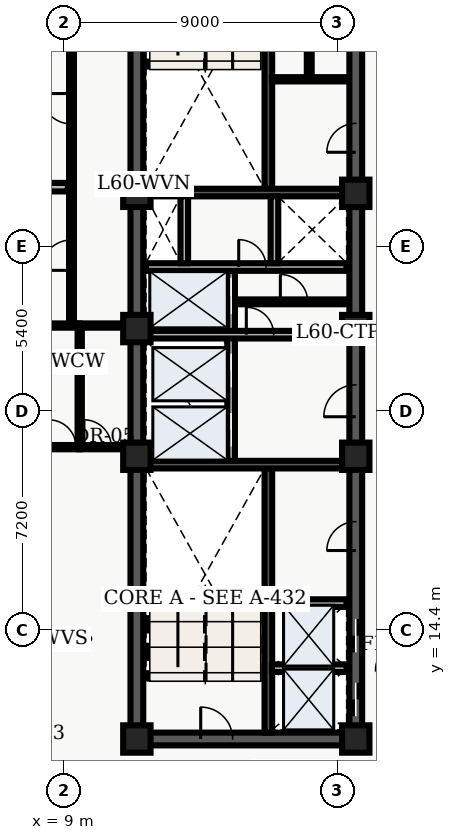
"""IFC4 building model, lengths in metres.
Left out: names, types, materials, properties, quantities, classifications, styles, units other than length and angle.
Written with IfcOpenShell. Run it as: python <this file> out.ifc"""

import sys

from ifc_helpers import new_model, entity, si_unit, converted_unit, direction, frame, origin_with_axes, origin_2d_with_axis, place, context, subcontext, project, spatial, polyline, rectangle, outline, extrude, element, fill, save


model = new_model("IFC4")
c1 = context("Model", 3, precision=1e-05, world=origin_with_axes(), true_north=direction((0.0, 1.0)))
c2 = subcontext(c1, "Body", "Model", "MODEL_VIEW")
j1 = project(units=[si_unit("LENGTHUNIT", "METRE"), converted_unit("PLANEANGLEUNIT", "DEGREE", entity("IfcPlaneAngleMeasure", 0.017), si_unit("PLANEANGLEUNIT", "RADIAN"), dimensions=[0, 0, 0, 0, 0, 0, 0])], contexts=[c1])
p1 = place(None, origin_with_axes())
s1 = spatial("IfcSite", under=j1, at=p1, CompositionType="ELEMENT")
p2 = place(p1, origin_with_axes())
s2 = spatial("IfcBuilding", under=s1, at=p2, CompositionType="ELEMENT")
p3 = place(p2, frame((0.0, 0.0, 244.2), z_axis=(0.0, 0.0, 1.0), x_axis=(1.0, 0.0, 0.0)))
s3 = spatial("IfcBuildingStorey", under=s2, at=p3, CompositionType="ELEMENT", Elevation=244.2)
p4 = place(p3, frame((11.4, 10.8, 0.0), z_axis=(0.0, 0.0, 1.0), x_axis=(0.0, 1.0, 0.0)))
e1 = element("IfcWall", 1, at=p4, inside=s3, PredefinedType="SHEAR", context=c2, shape_type="SweptSolid", body=[
    extrude(outline(polyline([(0.0, -0.21), (27.0, -0.21), (27.0, 0.21), (0.0, 0.21), (0.0, -0.21)])), origin_with_axes(), (0.0, 0.0, 1.0), 3.6),
])
p5 = place(p3, frame((11.4, 10.8, 0.0), z_axis=(0.0, 0.0, 1.0), x_axis=(1.0, 0.0, 0.0)))
e2 = element("IfcWall", 2, at=p5, inside=s3, PredefinedType="SHEAR", context=c2, shape_type="SweptSolid", body=[
    extrude(outline(polyline([(0.0, -0.21), (7.2, -0.21), (7.2, 0.21), (0.0, 0.21), (0.0, -0.21)])), origin_with_axes(), (0.0, 0.0, 1.0), 3.6),
])
p6 = place(p5, frame((2.625, 0.0, 0.0), z_axis=(0.0, 0.0, 1.0), x_axis=(1.0, 0.0, 0.0)))
e3 = element("IfcOpeningElement", 3, at=p6, cuts=e2, PredefinedType="OPENING", context=c2, shape_type="SweptSolid", body=[
    extrude(rectangle(XDim=1.05, YDim=0.44, at=origin_2d_with_axis()), origin_with_axes(), (0.0, 0.0, 1.0), 2.15),
])
p7 = place(p3, frame((18.6, 10.8, 0.0), z_axis=(0.0, 0.0, 1.0), x_axis=(0.0, 1.0, 0.0)))
e4 = element("IfcWall", 4, at=p7, inside=s3, PredefinedType="SHEAR", context=c2, shape_type="SweptSolid", body=[
    extrude(outline(polyline([(0.0, -0.21), (13.5, -0.21), (13.5, 0.21), (0.0, 0.21), (0.0, -0.21)])), origin_with_axes(), (0.0, 0.0, 1.0), 3.6),
])
p8 = place(p7, frame((1.3, 0.0, 0.0), z_axis=(0.0, 0.0, 1.0), x_axis=(1.0, 0.0, 0.0)))
e5 = element("IfcOpeningElement", 5, at=p8, cuts=e4, PredefinedType="OPENING", context=c2, shape_type="SweptSolid", body=[
    extrude(rectangle(XDim=1.1, YDim=0.44, at=origin_2d_with_axis()), origin_with_axes(), (0.0, 0.0, 1.0), 2.15),
])
p9 = place(p7, frame((3.4, 0.0, 0.0), z_axis=(0.0, 0.0, 1.0), x_axis=(1.0, 0.0, 0.0)))
e6 = element("IfcOpeningElement", 6, at=p9, cuts=e4, PredefinedType="OPENING", context=c2, shape_type="SweptSolid", body=[
    extrude(rectangle(XDim=1.1, YDim=0.44, at=origin_2d_with_axis()), origin_with_axes(), (0.0, 0.0, 1.0), 2.15),
])
p10 = place(p7, frame((11.125, 0.0, 0.0), z_axis=(0.0, 0.0, 1.0), x_axis=(1.0, 0.0, 0.0)))
e7 = element("IfcOpeningElement", 7, at=p10, cuts=e4, PredefinedType="OPENING", context=c2, shape_type="SweptSolid", body=[
    extrude(rectangle(XDim=1.05, YDim=0.44, at=origin_2d_with_axis()), origin_with_axes(), (0.0, 0.0, 1.0), 2.15),
])
p11 = place(p7, frame((6.675, 0.0, 0.0), z_axis=(0.0, 0.0, 1.0), x_axis=(1.0, 0.0, 0.0)))
e8 = element("IfcOpeningElement", 8, at=p11, cuts=e4, PredefinedType="OPENING", context=c2, shape_type="SweptSolid", body=[
    extrude(rectangle(XDim=0.95, YDim=0.44, at=origin_2d_with_axis()), origin_with_axes(), (0.0, 0.0, 1.0), 2.15),
])
p12 = place(p3, frame((18.6, 24.3, 0.0), z_axis=(0.0, 0.0, 1.0), x_axis=(0.0, 1.0, 0.0)))
e9 = element("IfcWall", 9, at=p12, inside=s3, PredefinedType="SHEAR", context=c2, shape_type="SweptSolid", body=[
    extrude(outline(polyline([(0.0, -0.21), (13.5, -0.21), (13.5, 0.21), (0.0, 0.21), (0.0, -0.21)])), origin_with_axes(), (0.0, 0.0, 1.0), 3.6),
])
p13 = place(p12, frame((6.275, 0.0, 0.0), z_axis=(0.0, 0.0, 1.0), x_axis=(1.0, 0.0, 0.0)))
e10 = element("IfcOpeningElement", 10, at=p13, cuts=e9, PredefinedType="OPENING", context=c2, shape_type="SweptSolid", body=[
    extrude(rectangle(XDim=0.95, YDim=0.44, at=origin_2d_with_axis()), origin_with_axes(), (0.0, 0.0, 1.0), 2.15),
])
p14 = place(p12, frame((10.875, 0.0, 0.0), z_axis=(0.0, 0.0, 1.0), x_axis=(1.0, 0.0, 0.0)))
e11 = element("IfcOpeningElement", 11, at=p14, cuts=e9, PredefinedType="OPENING", context=c2, shape_type="SweptSolid", body=[
    extrude(rectangle(XDim=0.95, YDim=0.44, at=origin_2d_with_axis()), origin_with_axes(), (0.0, 0.0, 1.0), 2.15),
])
p15 = place(p3, frame((15.725, 11.01, 0.0), z_axis=(0.0, 0.0, 1.0), x_axis=(0.0, 1.0, 0.0)))
e12 = element("IfcWall", 12, at=p15, inside=s3, PredefinedType="SHEAR", context=c2, shape_type="SweptSolid", body=[
    extrude(outline(polyline([(0.0, -0.125), (8.69, -0.125), (8.69, 0.125), (0.0, 0.125), (0.0, -0.125)])), origin_with_axes(), (0.0, 0.0, 1.0), 3.6),
])
p16 = place(p3, frame((11.61, 19.825, 0.0), z_axis=(0.0, 0.0, 1.0), x_axis=(1.0, 0.0, 0.0)))
e13 = element("IfcWall", 13, at=p16, inside=s3, PredefinedType="SHEAR", context=c2, shape_type="SweptSolid", body=[
    extrude(outline(polyline([(0.0, -0.125), (6.78, -0.125), (6.78, 0.125), (0.0, 0.125), (0.0, -0.125)])), origin_with_axes(), (0.0, 0.0, 1.0), 3.6),
])
p17 = place(p3, frame((15.725, 28.9, 0.0), z_axis=(0.0, 0.0, 1.0), x_axis=(0.0, 1.0, 0.0)))
e14 = element("IfcWall", 14, at=p17, inside=s3, PredefinedType="SHEAR", context=c2, shape_type="SweptSolid", body=[
    extrude(outline(polyline([(0.0, -0.125), (8.69, -0.125), (8.69, 0.125), (0.0, 0.125), (0.0, -0.125)])), origin_with_axes(), (0.0, 0.0, 1.0), 3.6),
])
p18 = place(p3, frame((11.61, 28.775, 0.0), z_axis=(0.0, 0.0, 1.0), x_axis=(1.0, 0.0, 0.0)))
e15 = element("IfcWall", 15, at=p18, inside=s3, PredefinedType="SHEAR", context=c2, shape_type="SweptSolid", body=[
    extrude(outline(polyline([(0.0, -0.125), (6.78, -0.125), (6.78, 0.125), (0.0, 0.125), (0.0, -0.125)])), origin_with_axes(), (0.0, 0.0, 1.0), 3.6),
])
p19 = place(p3, frame((14.5, 19.95, 0.0), z_axis=(0.0, 0.0, 1.0), x_axis=(0.0, 1.0, 0.0)))
e16 = element("IfcWall", 16, at=p19, inside=s3, PredefinedType="SOLIDWALL", context=c2, shape_type="SweptSolid", body=[
    extrude(outline(polyline([(0.0, -0.125), (6.25, -0.125), (6.25, 0.125), (0.0, 0.125), (0.0, -0.125)])), origin_with_axes(), (0.0, 0.0, 1.0), 2.64),
])
p20 = place(p19, frame((1.025, 0.0, 0.0), z_axis=(0.0, 0.0, 1.0), x_axis=(1.0, 0.0, 0.0)))
e17 = element("IfcOpeningElement", 17, at=p20, cuts=e16, PredefinedType="OPENING", context=c2, shape_type="SweptSolid", body=[
    extrude(rectangle(XDim=1.1, YDim=0.27, at=origin_2d_with_axis()), origin_with_axes(), (0.0, 0.0, 1.0), 2.15),
])
p21 = place(p19, frame((2.975, 0.0, 0.0), z_axis=(0.0, 0.0, 1.0), x_axis=(1.0, 0.0, 0.0)))
e18 = element("IfcOpeningElement", 18, at=p21, cuts=e16, PredefinedType="OPENING", context=c2, shape_type="SweptSolid", body=[
    extrude(rectangle(XDim=1.1, YDim=0.27, at=origin_2d_with_axis()), origin_with_axes(), (0.0, 0.0, 1.0), 2.15),
])
p22 = place(p19, frame((5.425, 0.0, 0.0), z_axis=(0.0, 0.0, 1.0), x_axis=(1.0, 0.0, 0.0)))
e19 = element("IfcOpeningElement", 19, at=p22, cuts=e16, PredefinedType="OPENING", context=c2, shape_type="SweptSolid", body=[
    extrude(rectangle(XDim=1.2, YDim=0.27, at=origin_2d_with_axis()), origin_with_axes(), (0.0, 0.0, 1.0), 2.15),
])
p23 = place(p3, frame((11.7, 24.1, 0.0), z_axis=(0.0, 0.0, 1.0), x_axis=(1.0, 0.0, 0.0)))
e20 = element("IfcWall", 20, at=p23, inside=s3, PredefinedType="SOLIDWALL", context=c2, shape_type="SweptSolid", body=[
    extrude(outline(polyline([(0.0, -0.125), (6.6, -0.125), (6.6, 0.125), (0.0, 0.125), (0.0, -0.125)])), origin_with_axes(), (0.0, 0.0, 1.0), 2.64),
])
p24 = place(p23, frame((3.75, 0.0, 0.0), z_axis=(0.0, 0.0, 1.0), x_axis=(1.0, 0.0, 0.0)))
e21 = element("IfcOpeningElement", 21, at=p24, cuts=e20, PredefinedType="OPENING", context=c2, shape_type="SweptSolid", body=[
    extrude(rectangle(XDim=0.9, YDim=0.27, at=origin_2d_with_axis()), origin_with_axes(), (0.0, 0.0, 1.0), 2.15),
])
p25 = place(p3, frame((11.7, 26.325, 0.0), z_axis=(0.0, 0.0, 1.0), x_axis=(1.0, 0.0, 0.0)))
e22 = element("IfcWall", 22, at=p25, inside=s3, PredefinedType="SOLIDWALL", context=c2, shape_type="SweptSolid", body=[
    extrude(outline(polyline([(0.0, -0.125), (6.6, -0.125), (6.6, 0.125), (0.0, 0.125), (0.0, -0.125)])), origin_with_axes(), (0.0, 0.0, 1.0), 2.64),
])
p26 = place(p25, frame((3.5, 0.0, 0.0), z_axis=(0.0, 0.0, 1.0), x_axis=(1.0, 0.0, 0.0)))
e23 = element("IfcOpeningElement", 23, at=p26, cuts=e22, PredefinedType="OPENING", context=c2, shape_type="SweptSolid", body=[
    extrude(rectangle(XDim=0.9, YDim=0.27, at=origin_2d_with_axis()), origin_with_axes(), (0.0, 0.0, 1.0), 2.15),
])
for number, where, z_axis, x_axis in (
    (24, (12.96, 26.45, 0.0), (0.0, 0.0, 1.0), (0.0, 1.0, 0.0)),
    (25, (15.925, 26.45, 0.0), (0.0, 0.0, 1.0), (0.0, 1.0, 0.0)),
):
    element("IfcWall", number, at=place(p3, frame(where, z_axis=z_axis, x_axis=x_axis)), inside=s3, PredefinedType="SOLIDWALL", context=c2, shape_type="SweptSolid", body=[
        extrude(outline(polyline([(0.0, -0.125), (2.2, -0.125), (2.2, 0.125), (0.0, 0.125), (0.0, -0.125)])), origin_with_axes(), (0.0, 0.0, 1.0), 2.64),
    ])
for number, where, z_axis, x_axis in (
    (26, (11.4, 10.8, 0.0), (0.0, 0.0, 1.0), (1.0, 0.0, 0.0)),
    (27, (11.4, 20.1, 0.0), (0.0, 0.0, 1.0), (1.0, 0.0, 0.0)),
    (28, (11.4, 24.3, 0.0), (0.0, 0.0, 1.0), (1.0, 0.0, 0.0)),
    (29, (11.4, 28.75, 0.0), (0.0, 0.0, 1.0), (1.0, 0.0, 0.0)),
    (30, (18.6, 10.8, 0.0), (0.0, 0.0, 1.0), (1.0, 0.0, 0.0)),
    (31, (18.6, 20.1, 0.0), (0.0, 0.0, 1.0), (1.0, 0.0, 0.0)),
    (32, (18.6, 24.3, 0.0), (0.0, 0.0, 1.0), (1.0, 0.0, 0.0)),
    (33, (18.6, 28.75, 0.0), (0.0, 0.0, 1.0), (1.0, 0.0, 0.0)),
):
    element("IfcColumn", number, at=place(p3, frame(where, z_axis=z_axis, x_axis=x_axis)), inside=s3, PredefinedType="COLUMN", context=c2, shape_type="SweptSolid", body=[
        extrude(rectangle(XDim=0.9, YDim=0.9, at=origin_2d_with_axis()), origin_with_axes(), (0.0, 0.0, 1.0), 3.9),
    ])
p27 = place(p3, frame((14.62, 25.18, 0.0), z_axis=(0.0, 0.0, 1.0), x_axis=(1.0, 0.0, 0.0)))
e34 = element("IfcWall", 34, at=p27, inside=s3, PredefinedType="PARTITIONING", context=c2, shape_type="SweptSolid", body=[
    extrude(outline(polyline([(0.0, -0.08), (3.68, -0.08), (3.68, 0.08), (0.0, 0.08), (0.0, -0.08)])), origin_with_axes(), (0.0, 0.0, 1.0), 2.64),
])
p28 = place(p27, frame((1.95, 0.0, 0.0), z_axis=(0.0, 0.0, 1.0), x_axis=(1.0, 0.0, 0.0)))
e35 = element("IfcOpeningElement", 35, at=p28, cuts=e34, PredefinedType="OPENING", context=c2, shape_type="SweptSolid", body=[
    extrude(rectangle(XDim=0.9, YDim=0.18, at=origin_2d_with_axis()), origin_with_axes(), (0.0, 0.0, 1.0), 2.15),
])
for number, where, z_axis, x_axis in (
    (36, (15.84, 13.13, 0.0), (0.0, 0.0, 1.0), (1.0, 0.0, 0.0)),
    (37, (15.84, 15.27, 0.0), (0.0, 0.0, 1.0), (1.0, 0.0, 0.0)),
):
    element("IfcWall", number, at=place(p3, frame(where, z_axis=z_axis, x_axis=x_axis)), inside=s3, PredefinedType="SOLIDWALL", context=c2, shape_type="SweptSolid", body=[
        extrude(outline(polyline([(0.0, -0.125), (2.46, -0.125), (2.46, 0.125), (0.0, 0.125), (0.0, -0.125)])), origin_with_axes(), (0.0, 0.0, 1.0), 2.64),
    ])
p29 = place(p3, frame((15.84, 32.5, 0.0), z_axis=(0.0, 0.0, 1.0), x_axis=(1.0, 0.0, 0.0)))
e38 = element("IfcWall", 38, at=p29, inside=s3, PredefinedType="PARTITIONING", context=c2, shape_type="SweptSolid", body=[
    extrude(outline(polyline([(0.0, -0.07), (2.46, -0.07), (2.46, 0.07), (0.0, 0.07), (0.0, -0.07)])), origin_with_axes(), (0.0, 0.0, 1.0), 2.64),
])
p30 = place(p3, frame((17.07, 32.58, 0.0), z_axis=(0.0, 0.0, 1.0), x_axis=(0.0, 1.0, 0.0)))
e39 = element("IfcWall", 39, at=p30, inside=s3, PredefinedType="PARTITIONING", context=c2, shape_type="SweptSolid", body=[
    extrude(outline(polyline([(0.0, -0.08), (4.92, -0.08), (4.92, 0.08), (0.0, 0.08), (0.0, -0.08)])), origin_with_axes(), (0.0, 0.0, 1.0), 2.64),
])
p31 = place(p30, frame((2.45, 0.0, 0.0), z_axis=(0.0, 0.0, 1.0), x_axis=(1.0, 0.0, 0.0)))
e40 = element("IfcOpeningElement", 40, at=p31, cuts=e39, PredefinedType="OPENING", context=c2, shape_type="SweptSolid", body=[
    extrude(rectangle(XDim=0.9, YDim=0.18, at=origin_2d_with_axis()), origin_with_axes(), (0.0, 0.0, 1.0), 2.15),
])
p32 = place(p3, frame((9.52, 20.4, 0.0), z_axis=(0.0, 0.0, 1.0), x_axis=(0.0, 1.0, 0.0)))
e41 = element("IfcWall", 41, at=p32, inside=s3, PredefinedType="PARTITIONING", context=c2, shape_type="SweptSolid", body=[
    extrude(outline(polyline([(0.0, -0.07), (4.0, -0.07), (4.0, 0.07), (0.0, 0.07), (0.0, -0.07)])), origin_with_axes(), (0.0, 0.0, 1.0), 2.64),
])
p33 = place(p3, frame((9.52, 20.4, 0.0), z_axis=(0.0, 0.0, 1.0), x_axis=(1.0, 0.0, 0.0)))
e42 = element("IfcWall", 42, at=p33, inside=s3, PredefinedType="PARTITIONING", context=c2, shape_type="SweptSolid", body=[
    extrude(outline(polyline([(0.0, -0.07), (1.58, -0.07), (1.58, 0.07), (0.0, 0.07), (0.0, -0.07)])), origin_with_axes(), (0.0, 0.0, 1.0), 2.64),
])
p34 = place(p33, frame((0.59, 0.0, 0.0), z_axis=(0.0, 0.0, 1.0), x_axis=(1.0, 0.0, 0.0)))
e43 = element("IfcOpeningElement", 43, at=p34, cuts=e42, PredefinedType="OPENING", context=c2, shape_type="SweptSolid", body=[
    extrude(rectangle(XDim=0.9, YDim=0.16, at=origin_2d_with_axis()), origin_with_axes(), (0.0, 0.0, 1.0), 2.15),
])
p35 = place(p3, frame((9.52, 24.4, 0.0), z_axis=(0.0, 0.0, 1.0), x_axis=(1.0, 0.0, 0.0)))
e44 = element("IfcWall", 44, at=p35, inside=s3, PredefinedType="PARTITIONING", context=c2, shape_type="SweptSolid", body=[
    extrude(outline(polyline([(0.0, -0.07), (1.58, -0.07), (1.58, 0.07), (0.0, 0.07), (0.0, -0.07)])), origin_with_axes(), (0.0, 0.0, 1.0), 2.64),
])
p36 = place(p3, frame((9.25, 24.4, 0.0), z_axis=(0.0, 0.0, 1.0), x_axis=(0.0, 1.0, 0.0)))
e45 = element("IfcWall", 45, at=p36, inside=s3, PredefinedType="PARTITIONING", context=c2, shape_type="SweptSolid", body=[
    extrude(outline(polyline([(0.0, -0.08), (16.1, -0.08), (16.1, 0.08), (0.0, 0.08), (0.0, -0.08)])), origin_with_axes(), (0.0, 0.0, 1.0), 2.64),
])
p37 = place(p36, frame((2.316, 0.0, 0.0), z_axis=(0.0, 0.0, 1.0), x_axis=(1.0, 0.0, 0.0)))
e46 = element("IfcOpeningElement", 46, at=p37, cuts=e45, PredefinedType="OPENING", context=c2, shape_type="SweptSolid", body=[
    extrude(rectangle(XDim=1.0, YDim=0.18, at=origin_2d_with_axis()), origin_with_axes(), (0.0, 0.0, 1.0), 2.15),
])
p38 = place(p36, frame((7.131, 0.0, 0.0), z_axis=(0.0, 0.0, 1.0), x_axis=(1.0, 0.0, 0.0)))
e47 = element("IfcOpeningElement", 47, at=p38, cuts=e45, PredefinedType="OPENING", context=c2, shape_type="SweptSolid", body=[
    extrude(rectangle(XDim=1.0, YDim=0.18, at=origin_2d_with_axis()), origin_with_axes(), (0.0, 0.0, 1.0), 2.15),
])
p39 = place(p36, frame((12.841, 0.0, 0.0), z_axis=(0.0, 0.0, 1.0), x_axis=(1.0, 0.0, 0.0)))
e48 = element("IfcOpeningElement", 48, at=p39, cuts=e45, PredefinedType="OPENING", context=c2, shape_type="SweptSolid", body=[
    extrude(rectangle(XDim=1.0, YDim=0.18, at=origin_2d_with_axis()), origin_with_axes(), (0.0, 0.0, 1.0), 2.15),
])
p40 = place(p3, frame((4.835, 20.4, 0.0), z_axis=(0.0, 0.0, 1.0), x_axis=(1.0, 0.0, 0.0)))
e49 = element("IfcWall", 49, at=p40, inside=s3, PredefinedType="PARTITIONING", context=c2, shape_type="SweptSolid", body=[
    extrude(outline(polyline([(0.0, -0.07), (4.685, -0.07), (4.685, 0.07), (0.0, 0.07), (0.0, -0.07)])), origin_with_axes(), (0.0, 0.0, 1.0), 2.64),
])
p41 = place(p40, frame((4.115, 0.0, 0.0), z_axis=(0.0, 0.0, 1.0), x_axis=(1.0, 0.0, 0.0)))
e50 = element("IfcOpeningElement", 50, at=p41, cuts=e49, PredefinedType="OPENING", context=c2, shape_type="SweptSolid", body=[
    extrude(rectangle(XDim=0.9, YDim=0.16, at=origin_2d_with_axis()), origin_with_axes(), (0.0, 0.0, 1.0), 2.15),
])
p42 = place(p3, frame((4.835, 24.4, 0.0), z_axis=(0.0, 0.0, 1.0), x_axis=(1.0, 0.0, 0.0)))
e51 = element("IfcWall", 51, at=p42, inside=s3, PredefinedType="PARTITIONING", context=c2, shape_type="SweptSolid", body=[
    extrude(outline(polyline([(0.0, -0.07), (4.685, -0.07), (4.685, 0.07), (0.0, 0.07), (0.0, -0.07)])), origin_with_axes(), (0.0, 0.0, 1.0), 2.64),
])
p43 = place(p3, frame((4.835, 28.952, 0.0), z_axis=(0.0, 0.0, 1.0), x_axis=(1.0, 0.0, 0.0)))
e52 = element("IfcWall", 52, at=p43, inside=s3, PredefinedType="PARTITIONING", context=c2, shape_type="SweptSolid", body=[
    extrude(outline(polyline([(0.0, -0.14), (4.295, -0.14), (4.295, 0.14), (0.0, 0.14), (0.0, -0.14)])), origin_with_axes(), (0.0, 0.0, 1.0), 2.64),
])
p44 = place(p7, frame((1.3, 0.0, 0.0), z_axis=(0.0, 0.0, 1.0), x_axis=(1.0, 0.0, 0.0)))
e53 = element("IfcDoor", 53, at=p44, inside=s3, OperationType="SLIDING_TO_LEFT", PredefinedType="DOOR", context=c2, shape_type="SweptSolid", body=[
    extrude(rectangle(XDim=1.1, YDim=0.09, at=origin_2d_with_axis()), origin_with_axes(), (0.0, 0.0, 1.0), 2.15),
])
fill(e5, e53)
p45 = place(p7, frame((3.4, 0.0, 0.0), z_axis=(0.0, 0.0, 1.0), x_axis=(1.0, 0.0, 0.0)))
e54 = element("IfcDoor", 54, at=p45, inside=s3, OperationType="SLIDING_TO_RIGHT", PredefinedType="DOOR", context=c2, shape_type="SweptSolid", body=[
    extrude(rectangle(XDim=1.1, YDim=0.09, at=origin_2d_with_axis()), origin_with_axes(), (0.0, 0.0, 1.0), 2.15),
])
fill(e6, e54)
p46 = place(p19, frame((1.025, 0.0, 0.0), z_axis=(0.0, 0.0, 1.0), x_axis=(1.0, 0.0, 0.0)))
e55 = element("IfcDoor", 55, at=p46, inside=s3, OperationType="SLIDING_TO_LEFT", PredefinedType="DOOR", context=c2, shape_type="SweptSolid", body=[
    extrude(rectangle(XDim=1.1, YDim=0.09, at=origin_2d_with_axis()), origin_with_axes(), (0.0, 0.0, 1.0), 2.15),
])
fill(e17, e55)
p47 = place(p19, frame((2.975, 0.0, 0.0), z_axis=(0.0, 0.0, 1.0), x_axis=(1.0, 0.0, 0.0)))
e56 = element("IfcDoor", 56, at=p47, inside=s3, OperationType="SLIDING_TO_RIGHT", PredefinedType="DOOR", context=c2, shape_type="SweptSolid", body=[
    extrude(rectangle(XDim=1.1, YDim=0.09, at=origin_2d_with_axis()), origin_with_axes(), (0.0, 0.0, 1.0), 2.15),
])
fill(e18, e56)
p48 = place(p19, frame((5.425, 0.0, 0.0), z_axis=(0.0, 0.0, 1.0), x_axis=(1.0, 0.0, 0.0)))
e57 = element("IfcDoor", 57, at=p48, inside=s3, OperationType="DOUBLE_DOOR_SLIDING", PredefinedType="DOOR", context=c2, shape_type="SweptSolid", body=[
    extrude(rectangle(XDim=1.2, YDim=0.09, at=origin_2d_with_axis()), origin_with_axes(), (0.0, 0.0, 1.0), 2.15),
])
fill(e19, e57)
p49 = place(p5, frame((2.625, 0.0, 0.0), z_axis=(0.0, 0.0, 1.0), x_axis=(1.0, 0.0, 0.0)))
e58 = element("IfcDoor", 58, at=p49, inside=s3, OperationType="SINGLE_SWING_LEFT", PredefinedType="DOOR", context=c2, shape_type="SweptSolid", body=[
    extrude(rectangle(XDim=1.05, YDim=0.09, at=origin_2d_with_axis()), origin_with_axes(), (0.0, 0.0, 1.0), 2.15),
])
fill(e3, e58)
p50 = place(p7, frame((11.125, 0.0, 0.0), z_axis=(0.0, 0.0, 1.0), x_axis=(1.0, 0.0, 0.0)))
e59 = element("IfcDoor", 59, at=p50, inside=s3, OperationType="SINGLE_SWING_LEFT", PredefinedType="DOOR", context=c2, shape_type="SweptSolid", body=[
    extrude(rectangle(XDim=1.05, YDim=0.09, at=origin_2d_with_axis()), origin_with_axes(), (0.0, 0.0, 1.0), 2.15),
])
fill(e7, e59)
p51 = place(p25, frame((3.5, 0.0, 0.0), z_axis=(0.0, 0.0, 1.0), x_axis=(1.0, 0.0, 0.0)))
e60 = element("IfcDoor", 60, at=p51, inside=s3, OperationType="SINGLE_SWING_LEFT", PredefinedType="DOOR", context=c2, shape_type="SweptSolid", body=[
    extrude(rectangle(XDim=0.9, YDim=0.09, at=origin_2d_with_axis()), origin_with_axes(), (0.0, 0.0, 1.0), 2.15),
])
fill(e23, e60)
p52 = place(p23, frame((3.75, 0.0, 0.0), z_axis=(0.0, 0.0, 1.0), x_axis=(1.0, 0.0, 0.0)))
e61 = element("IfcDoor", 61, at=p52, inside=s3, OperationType="SINGLE_SWING_LEFT", PredefinedType="DOOR", context=c2, shape_type="SweptSolid", body=[
    extrude(rectangle(XDim=0.9, YDim=0.09, at=origin_2d_with_axis()), origin_with_axes(), (0.0, 0.0, 1.0), 2.15),
])
fill(e21, e61)
p53 = place(p27, frame((1.95, 0.0, 0.0), z_axis=(0.0, 0.0, 1.0), x_axis=(1.0, 0.0, 0.0)))
e62 = element("IfcDoor", 62, at=p53, inside=s3, OperationType="SINGLE_SWING_LEFT", PredefinedType="DOOR", context=c2, shape_type="SweptSolid", body=[
    extrude(rectangle(XDim=0.9, YDim=0.09, at=origin_2d_with_axis()), origin_with_axes(), (0.0, 0.0, 1.0), 2.15),
])
fill(e35, e62)
p54 = place(p7, frame((6.675, 0.0, 0.0), z_axis=(0.0, 0.0, 1.0), x_axis=(1.0, 0.0, 0.0)))
e63 = element("IfcDoor", 63, at=p54, inside=s3, OperationType="SINGLE_SWING_LEFT", PredefinedType="DOOR", context=c2, shape_type="SweptSolid", body=[
    extrude(rectangle(XDim=0.95, YDim=0.09, at=origin_2d_with_axis()), origin_with_axes(), (0.0, 0.0, 1.0), 2.15),
])
fill(e8, e63)
p55 = place(p12, frame((6.275, 0.0, 0.0), z_axis=(0.0, 0.0, 1.0), x_axis=(1.0, 0.0, 0.0)))
e64 = element("IfcDoor", 64, at=p55, inside=s3, OperationType="SINGLE_SWING_LEFT", PredefinedType="DOOR", context=c2, shape_type="SweptSolid", body=[
    extrude(rectangle(XDim=0.95, YDim=0.09, at=origin_2d_with_axis()), origin_with_axes(), (0.0, 0.0, 1.0), 2.15),
])
fill(e10, e64)
p56 = place(p33, frame((0.59, 0.0, 0.0), z_axis=(0.0, 0.0, 1.0), x_axis=(1.0, 0.0, 0.0)))
e65 = element("IfcDoor", 65, at=p56, inside=s3, OperationType="SINGLE_SWING_LEFT", PredefinedType="DOOR", context=c2, shape_type="SweptSolid", body=[
    extrude(rectangle(XDim=0.9, YDim=0.084, at=origin_2d_with_axis()), origin_with_axes(), (0.0, 0.0, 1.0), 2.15),
])
fill(e43, e65)
p57 = place(p40, frame((4.115, 0.0, 0.0), z_axis=(0.0, 0.0, 1.0), x_axis=(1.0, 0.0, 0.0)))
e66 = element("IfcDoor", 66, at=p57, inside=s3, OperationType="SINGLE_SWING_LEFT", PredefinedType="DOOR", context=c2, shape_type="SweptSolid", body=[
    extrude(rectangle(XDim=0.9, YDim=0.084, at=origin_2d_with_axis()), origin_with_axes(), (0.0, 0.0, 1.0), 2.15),
])
fill(e50, e66)
p58 = place(p36, frame((2.316, 0.0, 0.0), z_axis=(0.0, 0.0, 1.0), x_axis=(1.0, 0.0, 0.0)))
e67 = element("IfcDoor", 67, at=p58, inside=s3, OperationType="SINGLE_SWING_LEFT", PredefinedType="DOOR", context=c2, shape_type="SweptSolid", body=[
    extrude(rectangle(XDim=1.0, YDim=0.09, at=origin_2d_with_axis()), origin_with_axes(), (0.0, 0.0, 1.0), 2.15),
])
fill(e46, e67)
p59 = place(p36, frame((7.131, 0.0, 0.0), z_axis=(0.0, 0.0, 1.0), x_axis=(1.0, 0.0, 0.0)))
e68 = element("IfcDoor", 68, at=p59, inside=s3, OperationType="SINGLE_SWING_RIGHT", PredefinedType="DOOR", context=c2, shape_type="SweptSolid", body=[
    extrude(rectangle(XDim=1.0, YDim=0.09, at=origin_2d_with_axis()), origin_with_axes(), (0.0, 0.0, 1.0), 2.15),
])
fill(e47, e68)
save(model, sys.argv[1])
